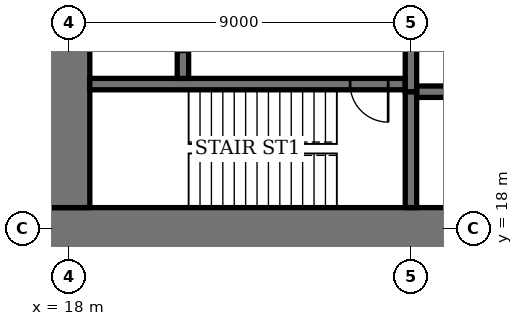
"""IFC4 building model, lengths in metres.
Left out: names, types, materials, properties, quantities, classifications, styles, units other than length and angle.
Written with IfcOpenShell. Run it as: python <this file> out.ifc"""

import sys

from ifc_helpers import new_model, si_unit, direction, frame, frame_2d, origin, place, context, subcontext, project, spatial, rectangle, extrude, element, fill, save


model = new_model("IFC4")
c1 = context("Model", 3, precision=1e-05, world=origin(), true_north=direction((0.0, 1.0)))
c2 = subcontext(c1, "Body", "Model", "MODEL_VIEW")
j1 = project(units=[si_unit("LENGTHUNIT", "METRE"), si_unit("PLANEANGLEUNIT", "RADIAN")], contexts=[c1])
p1 = place(None, origin())
s1 = spatial("IfcSite", under=j1, at=p1, CompositionType="ELEMENT")
p2 = place(p1, origin())
s2 = spatial("IfcBuilding", under=s1, at=p2, CompositionType="ELEMENT")
p3 = place(p2, frame((0.0, 0.0, 133.0)))
s3 = spatial("IfcBuildingStorey", under=s2, at=p3, CompositionType="ELEMENT", Elevation=133.0)
p4 = place(p3, frame((17.45, 18.0, 0.0), z_axis=(0.0, 0.0, 1.0), x_axis=(1.0, 0.0, 0.0)))
e1 = element("IfcWall", 1, at=p4, inside=s3, PredefinedType="SHEAR", context=c2, shape_type="SweptSolid", body=[
    extrude(rectangle(XDim=28.1, YDim=1.1, at=frame_2d((14.05, 0.0))), origin(), (0.0, 0.0, 1.0), 4.0),
])
p5 = place(p4, frame((11.55, 0.0, 0.0)))
e2 = element("IfcOpeningElement", 2, at=p5, cuts=e1, PredefinedType="OPENING", context=c2, shape_type="SweptSolid", body=[
    extrude(rectangle(XDim=1.0, YDim=2.4, at=frame_2d((0.5, 1.2))), frame((0.0, 0.56, 0.0), z_axis=(0.0, -1.0, 0.0), x_axis=(1.0, 0.0, 0.0)), (0.0, 0.0, 1.0), 1.12),
])
p6 = place(p4, frame((16.55, 0.0, 0.0)))
e3 = element("IfcOpeningElement", 3, at=p6, cuts=e1, PredefinedType="OPENING", context=c2, shape_type="SweptSolid", body=[
    extrude(rectangle(XDim=1.0, YDim=2.4, at=frame_2d((0.5, 1.2))), frame((0.0, 0.56, 0.0), z_axis=(0.0, -1.0, 0.0), x_axis=(1.0, 0.0, 0.0)), (0.0, 0.0, 1.0), 1.12),
])
p7 = place(p4, frame((20.0, 0.0, 0.0)))
e4 = element("IfcOpeningElement", 4, at=p7, cuts=e1, PredefinedType="OPENING", context=c2, shape_type="SweptSolid", body=[
    extrude(rectangle(XDim=1.1, YDim=2.4, at=frame_2d((0.55, 1.2))), frame((0.0, 0.56, 0.0), z_axis=(0.0, -1.0, 0.0), x_axis=(1.0, 0.0, 0.0)), (0.0, 0.0, 1.0), 1.12),
])
p8 = place(p4, frame((24.05, 0.0, 0.0)))
e5 = element("IfcOpeningElement", 5, at=p8, cuts=e1, PredefinedType="OPENING", context=c2, shape_type="SweptSolid", body=[
    extrude(rectangle(XDim=1.0, YDim=2.4, at=frame_2d((0.5, 1.2))), frame((0.0, 0.56, 0.0), z_axis=(0.0, -1.0, 0.0), x_axis=(1.0, 0.0, 0.0)), (0.0, 0.0, 1.0), 1.12),
])
p9 = place(p3, frame((18.0, 35.45, 0.0), z_axis=(0.0, 0.0, 1.0), x_axis=(0.0, -1.0, 0.0)))
e6 = element("IfcWall", 6, at=p9, inside=s3, PredefinedType="SHEAR", context=c2, shape_type="SweptSolid", body=[
    extrude(rectangle(XDim=16.9, YDim=1.1, at=frame_2d((8.45, 0.0))), origin(), (0.0, 0.0, 1.0), 4.0),
])
p10 = place(p9, frame((8.45, 0.0, 0.0)))
e7 = element("IfcOpeningElement", 7, at=p10, cuts=e6, PredefinedType="OPENING", context=c2, shape_type="SweptSolid", body=[
    extrude(rectangle(XDim=1.8, YDim=2.4, at=frame_2d((0.9, 1.2))), frame((0.0, 0.56, 0.0), z_axis=(0.0, -1.0, 0.0), x_axis=(1.0, 0.0, 0.0)), (0.0, 0.0, 1.0), 1.12),
])
p11 = place(p3, frame((18.55, 21.8, 0.0), z_axis=(0.0, 0.0, 1.0), x_axis=(1.0, 0.0, 0.0)))
e8 = element("IfcWall", 8, at=p11, inside=s3, PredefinedType="SHEAR", context=c2, shape_type="SweptSolid", body=[
    extrude(rectangle(XDim=8.3, YDim=0.3, at=frame_2d((4.15, 0.0))), origin(), (0.0, 0.0, 1.0), 4.0),
])
p12 = place(p11, frame((6.85, 0.0, 0.0)))
e9 = element("IfcOpeningElement", 9, at=p12, cuts=e8, PredefinedType="OPENING", context=c2, shape_type="SweptSolid", body=[
    extrude(rectangle(XDim=1.0, YDim=2.4, at=frame_2d((0.5, 1.2))), frame((0.0, 0.16, 0.0), z_axis=(0.0, -1.0, 0.0), x_axis=(1.0, 0.0, 0.0)), (0.0, 0.0, 1.0), 0.32),
])
p13 = place(p3, frame((27.0, 18.55, 0.0), z_axis=(0.0, 0.0, 1.0), x_axis=(0.0, 1.0, 0.0)))
e10 = element("IfcWall", 10, at=p13, inside=s3, PredefinedType="SHEAR", context=c2, shape_type="SweptSolid", body=[
    extrude(rectangle(XDim=3.05, YDim=0.3, at=frame_2d((1.525, 0.0))), origin(), (0.0, 0.0, 1.0), 4.0),
])
p14 = place(p3, frame((21.0, 21.95, 0.0), z_axis=(0.0, 0.0, 1.0), x_axis=(0.0, 1.0, 0.0)))
e11 = element("IfcWall", 11, at=p14, inside=s3, PredefinedType="SHEAR", context=c2, shape_type="SweptSolid", body=[
    extrude(rectangle(XDim=2.5, YDim=0.3, at=frame_2d((1.25, 0.0))), origin(), (0.0, 0.0, 1.0), 4.0),
])
p15 = place(p14, frame((0.7, 0.0, 0.0)))
e12 = element("IfcOpeningElement", 12, at=p15, cuts=e11, PredefinedType="OPENING", context=c2, shape_type="SweptSolid", body=[
    extrude(rectangle(XDim=1.1, YDim=2.4, at=frame_2d((0.55, 1.2))), frame((0.0, 0.16, 0.0), z_axis=(0.0, -1.0, 0.0), x_axis=(1.0, 0.0, 0.0)), (0.0, 0.0, 1.0), 0.32),
])
p16 = place(p3, frame((27.15, 21.6, 0.0), z_axis=(0.0, 0.0, 1.0), x_axis=(1.0, 0.0, 0.0)))
e13 = element("IfcWall", 13, at=p16, inside=s3, PredefinedType="SHEAR", context=c2, shape_type="SweptSolid", body=[
    extrude(rectangle(XDim=17.3, YDim=0.3, at=frame_2d((8.65, 0.0))), origin(), (0.0, 0.0, 1.0), 4.0),
])
p17 = place(p3, frame((27.0, 21.6, 0.0), z_axis=(0.0, 0.0, 1.0), x_axis=(0.0, 1.0, 0.0)))
e14 = element("IfcWall", 14, at=p17, inside=s3, PredefinedType="SHEAR", context=c2, shape_type="SweptSolid", body=[
    extrude(rectangle(XDim=2.85, YDim=0.3, at=frame_2d((1.425, 0.0))), origin(), (0.0, 0.0, 1.0), 4.0),
])
p18 = place(p12, origin())
e15 = element("IfcDoor", 15, at=p18, inside=s3, OperationType="SINGLE_SWING_RIGHT", PredefinedType="DOOR", context=c2, shape_type="SweptSolid", body=[
    extrude(rectangle(XDim=1.0, YDim=2.4, at=frame_2d((0.5, 1.2))), frame((0.0, 0.03, 0.0), z_axis=(0.0, -1.0, 0.0), x_axis=(1.0, 0.0, 0.0)), (0.0, 0.0, 1.0), 0.06),
])
fill(e9, e15)
save(model, sys.argv[1])
